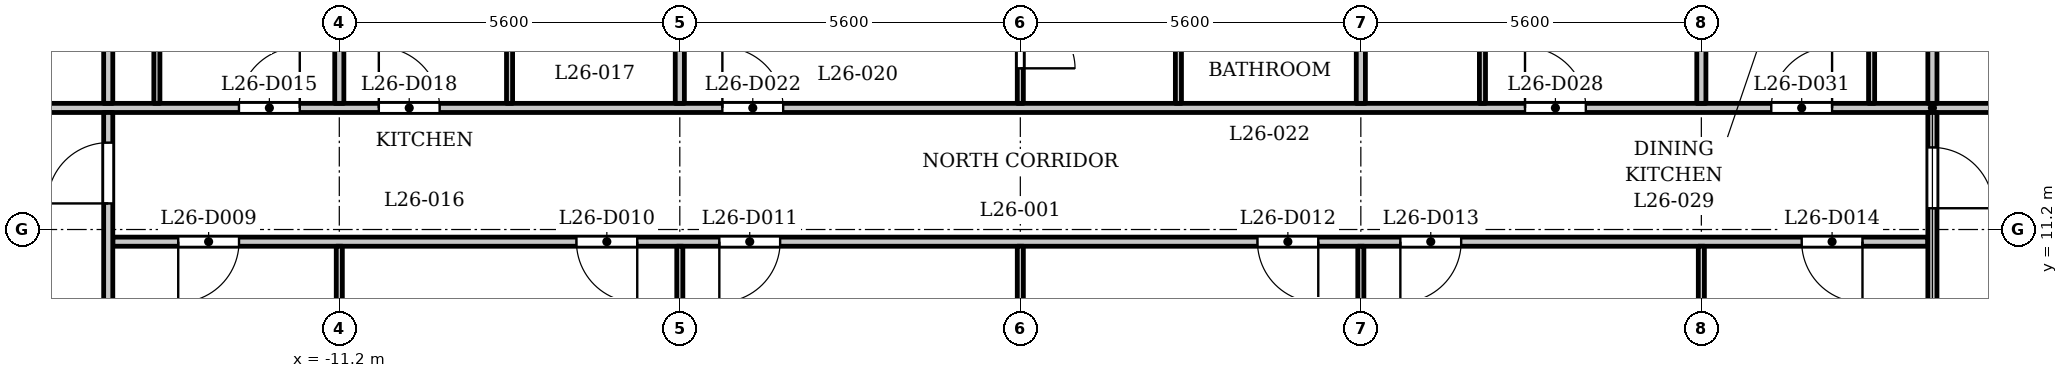
"""IFC4 building model, lengths in metres.
Left out: names, types, materials, properties, quantities, classifications, styles, units other than length and angle.
Written with IfcOpenShell. Run it as: python <this file> out.ifc"""

import sys

from ifc_helpers import new_model, si_unit, direction, frame, frame_2d, origin, place, context, subcontext, project, spatial, rectangle, extrude, element, fill, save


model = new_model("IFC4")
c1 = context("Model", 3, precision=1e-05, world=origin(), true_north=direction((0.0, 1.0)))
c2 = subcontext(c1, "Body", "Model", "MODEL_VIEW")
j1 = project(units=[si_unit("LENGTHUNIT", "METRE"), si_unit("PLANEANGLEUNIT", "RADIAN")], contexts=[c1])
p1 = place(None, origin())
s1 = spatial("IfcSite", under=j1, at=p1, CompositionType="ELEMENT")
p2 = place(p1, origin())
s2 = spatial("IfcBuilding", under=s1, at=p2, CompositionType="ELEMENT")
p3 = place(p2, frame((0.0, 0.0, 104.3)))
s3 = spatial("IfcBuildingStorey", under=s2, at=p3, CompositionType="ELEMENT", Elevation=104.3)
p4 = place(p3, frame((-14.925, 11.0, 0.0), z_axis=(0.0, 0.0, 1.0), x_axis=(1.0, 0.0, 0.0)))
e1 = element("IfcWall", 1, at=p4, inside=s3, PredefinedType="PARTITIONING", context=c2, shape_type="SweptSolid", body=[
    extrude(rectangle(XDim=29.85, YDim=0.15, at=frame_2d((14.925, 0.0))), origin(), (0.0, 0.0, 1.0), 3.2),
])
p5 = place(p4, frame((1.076, 0.0, 0.0)))
e2 = element("IfcOpeningElement", 2, at=p5, cuts=e1, PredefinedType="OPENING", context=c2, shape_type="SweptSolid", body=[
    extrude(rectangle(XDim=1.0, YDim=2.1, at=frame_2d((0.5, 1.05))), frame((0.0, 0.085, 0.0), z_axis=(0.0, -1.0, 0.0), x_axis=(1.0, 0.0, 0.0)), (0.0, 0.0, 1.0), 0.17),
])
p6 = place(p4, frame((7.625, 0.0, 0.0)))
e3 = element("IfcOpeningElement", 3, at=p6, cuts=e1, PredefinedType="OPENING", context=c2, shape_type="SweptSolid", body=[
    extrude(rectangle(XDim=1.0, YDim=2.1, at=frame_2d((0.5, 1.05))), frame((0.0, 0.085, 0.0), z_axis=(0.0, -1.0, 0.0), x_axis=(1.0, 0.0, 0.0)), (0.0, 0.0, 1.0), 0.17),
])
p7 = place(p4, frame((9.975, 0.0, 0.0)))
e4 = element("IfcOpeningElement", 4, at=p7, cuts=e1, PredefinedType="OPENING", context=c2, shape_type="SweptSolid", body=[
    extrude(rectangle(XDim=1.0, YDim=2.1, at=frame_2d((0.5, 1.05))), frame((0.0, 0.085, 0.0), z_axis=(0.0, -1.0, 0.0), x_axis=(1.0, 0.0, 0.0)), (0.0, 0.0, 1.0), 0.17),
])
p8 = place(p4, frame((18.825, 0.0, 0.0)))
e5 = element("IfcOpeningElement", 5, at=p8, cuts=e1, PredefinedType="OPENING", context=c2, shape_type="SweptSolid", body=[
    extrude(rectangle(XDim=1.0, YDim=2.1, at=frame_2d((0.5, 1.05))), frame((0.0, 0.085, 0.0), z_axis=(0.0, -1.0, 0.0), x_axis=(1.0, 0.0, 0.0)), (0.0, 0.0, 1.0), 0.17),
])
p9 = place(p4, frame((21.175, 0.0, 0.0)))
e6 = element("IfcOpeningElement", 6, at=p9, cuts=e1, PredefinedType="OPENING", context=c2, shape_type="SweptSolid", body=[
    extrude(rectangle(XDim=1.0, YDim=2.1, at=frame_2d((0.5, 1.05))), frame((0.0, 0.085, 0.0), z_axis=(0.0, -1.0, 0.0), x_axis=(1.0, 0.0, 0.0)), (0.0, 0.0, 1.0), 0.17),
])
p10 = place(p4, frame((27.775, 0.0, 0.0)))
e7 = element("IfcOpeningElement", 7, at=p10, cuts=e1, PredefinedType="OPENING", context=c2, shape_type="SweptSolid", body=[
    extrude(rectangle(XDim=1.0, YDim=2.1, at=frame_2d((0.5, 1.05))), frame((0.0, 0.085, 0.0), z_axis=(0.0, -1.0, 0.0), x_axis=(1.0, 0.0, 0.0)), (0.0, 0.0, 1.0), 0.17),
])
p11 = place(p3, frame((-17.4, 13.2, 0.0), z_axis=(0.0, 0.0, 1.0), x_axis=(1.0, 0.0, 0.0)))
e8 = element("IfcWall", 8, at=p11, inside=s3, PredefinedType="PARTITIONING", context=c2, shape_type="SweptSolid", body=[
    extrude(rectangle(XDim=34.8, YDim=0.15, at=frame_2d((17.4, 0.0))), origin(), (0.0, 0.0, 1.0), 3.2),
])
p12 = place(p11, frame((0.25, 0.0, 0.0)))
e9 = element("IfcOpeningElement", 9, at=p12, cuts=e8, PredefinedType="OPENING", context=c2, shape_type="SweptSolid", body=[
    extrude(rectangle(XDim=1.0, YDim=2.1, at=frame_2d((0.5, 1.05))), frame((0.0, 0.085, 0.0), z_axis=(0.0, -1.0, 0.0), x_axis=(1.0, 0.0, 0.0)), (0.0, 0.0, 1.0), 0.17),
])
p13 = place(p11, frame((33.65, 0.0, 0.0)))
e10 = element("IfcOpeningElement", 10, at=p13, cuts=e8, PredefinedType="OPENING", context=c2, shape_type="SweptSolid", body=[
    extrude(rectangle(XDim=1.0, YDim=2.1, at=frame_2d((0.5, 1.05))), frame((0.0, 0.085, 0.0), z_axis=(0.0, -1.0, 0.0), x_axis=(1.0, 0.0, 0.0)), (0.0, 0.0, 1.0), 0.17),
])
p14 = place(p11, frame((4.55, 0.0, 0.0)))
e11 = element("IfcOpeningElement", 11, at=p14, cuts=e8, PredefinedType="OPENING", context=c2, shape_type="SweptSolid", body=[
    extrude(rectangle(XDim=1.0, YDim=2.1, at=frame_2d((0.5, 1.05))), frame((0.0, 0.085, 0.0), z_axis=(0.0, -1.0, 0.0), x_axis=(1.0, 0.0, 0.0)), (0.0, 0.0, 1.0), 0.17),
])
p15 = place(p11, frame((6.85, 0.0, 0.0)))
e12 = element("IfcOpeningElement", 12, at=p15, cuts=e8, PredefinedType="OPENING", context=c2, shape_type="SweptSolid", body=[
    extrude(rectangle(XDim=1.0, YDim=2.1, at=frame_2d((0.5, 1.05))), frame((0.0, 0.085, 0.0), z_axis=(0.0, -1.0, 0.0), x_axis=(1.0, 0.0, 0.0)), (0.0, 0.0, 1.0), 0.17),
])
p16 = place(p11, frame((12.5, 0.0, 0.0)))
e13 = element("IfcOpeningElement", 13, at=p16, cuts=e8, PredefinedType="OPENING", context=c2, shape_type="SweptSolid", body=[
    extrude(rectangle(XDim=1.0, YDim=2.1, at=frame_2d((0.5, 1.05))), frame((0.0, 0.085, 0.0), z_axis=(0.0, -1.0, 0.0), x_axis=(1.0, 0.0, 0.0)), (0.0, 0.0, 1.0), 0.17),
])
p17 = place(p11, frame((25.7, 0.0, 0.0)))
e14 = element("IfcOpeningElement", 14, at=p17, cuts=e8, PredefinedType="OPENING", context=c2, shape_type="SweptSolid", body=[
    extrude(rectangle(XDim=1.0, YDim=2.1, at=frame_2d((0.5, 1.05))), frame((0.0, 0.085, 0.0), z_axis=(0.0, -1.0, 0.0), x_axis=(1.0, 0.0, 0.0)), (0.0, 0.0, 1.0), 0.17),
])
p18 = place(p11, frame((29.75, 0.0, 0.0)))
e15 = element("IfcOpeningElement", 15, at=p18, cuts=e8, PredefinedType="OPENING", context=c2, shape_type="SweptSolid", body=[
    extrude(rectangle(XDim=1.0, YDim=2.1, at=frame_2d((0.5, 1.05))), frame((0.0, 0.085, 0.0), z_axis=(0.0, -1.0, 0.0), x_axis=(1.0, 0.0, 0.0)), (0.0, 0.0, 1.0), 0.17),
])
p19 = place(p3, frame((-15.0, 6.769, 0.0), z_axis=(0.0, 0.0, 1.0), x_axis=(0.0, 1.0, 0.0)))
e16 = element("IfcWall", 16, at=p19, inside=s3, PredefinedType="PARTITIONING", context=c2, shape_type="SweptSolid", body=[
    extrude(rectangle(XDim=6.356, YDim=0.15, at=frame_2d((3.178, 0.0))), origin(), (0.0, 0.0, 1.0), 3.2),
])
p20 = place(p19, frame((4.86, 0.0, 0.0)))
e17 = element("IfcOpeningElement", 17, at=p20, cuts=e16, PredefinedType="OPENING", context=c2, shape_type="SweptSolid", body=[
    extrude(rectangle(XDim=1.0, YDim=2.1, at=frame_2d((0.5, 1.05))), frame((0.0, 0.085, 0.0), z_axis=(0.0, -1.0, 0.0), x_axis=(1.0, 0.0, 0.0)), (0.0, 0.0, 1.0), 0.17),
])
p21 = place(p3, frame((-15.0, 13.275, 0.0), z_axis=(0.0, 0.0, 1.0), x_axis=(0.0, 1.0, 0.0)))
e18 = element("IfcWall", 18, at=p21, inside=s3, PredefinedType="PARTITIONING", context=c2, shape_type="SweptSolid", body=[
    extrude(rectangle(XDim=2.05, YDim=0.15, at=frame_2d((1.025, 0.0))), origin(), (0.0, 0.0, 1.0), 3.2),
])
p22 = place(p3, frame((-14.2, 13.275, 0.0), z_axis=(0.0, 0.0, 1.0), x_axis=(0.0, 1.0, 0.0)))
e19 = element("IfcWall", 19, at=p22, inside=s3, PredefinedType="PARTITIONING", context=c2, shape_type="SweptSolid", body=[
    extrude(rectangle(XDim=3.175, YDim=0.1, at=frame_2d((1.587, 0.0))), origin(), (0.0, 0.0, 1.0), 3.2),
])
p23 = place(p3, frame((-11.2, 7.32, 0.0), z_axis=(0.0, 0.0, 1.0), x_axis=(0.0, 1.0, 0.0)))
e20 = element("IfcWall", 20, at=p23, inside=s3, PredefinedType="PARTITIONING", context=c2, shape_type="SweptSolid", body=[
    extrude(rectangle(XDim=3.605, YDim=0.1, at=frame_2d((1.802, 0.0))), origin(), (0.0, 0.0, 1.0), 3.2),
])
p24 = place(p3, frame((-11.2, 13.275, 0.0), z_axis=(0.0, 0.0, 1.0), x_axis=(0.0, 1.0, 0.0)))
e21 = element("IfcWall", 21, at=p24, inside=s3, PredefinedType="PARTITIONING", context=c2, shape_type="SweptSolid", body=[
    extrude(rectangle(XDim=3.175, YDim=0.15, at=frame_2d((1.587, 0.0))), origin(), (0.0, 0.0, 1.0), 3.2),
])
p25 = place(p3, frame((-8.4, 13.275, 0.0), z_axis=(0.0, 0.0, 1.0), x_axis=(0.0, 1.0, 0.0)))
e22 = element("IfcWall", 22, at=p25, inside=s3, PredefinedType="PARTITIONING", context=c2, shape_type="SweptSolid", body=[
    extrude(rectangle(XDim=3.175, YDim=0.1, at=frame_2d((1.587, 0.0))), origin(), (0.0, 0.0, 1.0), 3.2),
])
p26 = place(p3, frame((-5.6, 7.32, 0.0), z_axis=(0.0, 0.0, 1.0), x_axis=(0.0, 1.0, 0.0)))
e23 = element("IfcWall", 23, at=p26, inside=s3, PredefinedType="PARTITIONING", context=c2, shape_type="SweptSolid", body=[
    extrude(rectangle(XDim=3.605, YDim=0.1, at=frame_2d((1.802, 0.0))), origin(), (0.0, 0.0, 1.0), 3.2),
])
p27 = place(p3, frame((-5.6, 13.275, 0.0), z_axis=(0.0, 0.0, 1.0), x_axis=(0.0, 1.0, 0.0)))
e24 = element("IfcWall", 24, at=p27, inside=s3, PredefinedType="PARTITIONING", context=c2, shape_type="SweptSolid", body=[
    extrude(rectangle(XDim=3.175, YDim=0.15, at=frame_2d((1.587, 0.0))), origin(), (0.0, 0.0, 1.0), 3.2),
])
p28 = place(p3, frame((0.0, 7.32, 0.0), z_axis=(0.0, 0.0, 1.0), x_axis=(0.0, 1.0, 0.0)))
e25 = element("IfcWall", 25, at=p28, inside=s3, PredefinedType="PARTITIONING", context=c2, shape_type="SweptSolid", body=[
    extrude(rectangle(XDim=3.605, YDim=0.1, at=frame_2d((1.802, 0.0))), origin(), (0.0, 0.0, 1.0), 3.2),
])
p29 = place(p3, frame((0.0, 13.275, 0.0), z_axis=(0.0, 0.0, 1.0), x_axis=(0.0, 1.0, 0.0)))
e26 = element("IfcWall", 26, at=p29, inside=s3, PredefinedType="PARTITIONING", context=c2, shape_type="SweptSolid", body=[
    extrude(rectangle(XDim=3.175, YDim=0.1, at=frame_2d((1.587, 0.0))), origin(), (0.0, 0.0, 1.0), 3.2),
])
p30 = place(p29, frame((0.576, 0.0, 0.0)))
e27 = element("IfcOpeningElement", 27, at=p30, cuts=e26, PredefinedType="OPENING", context=c2, shape_type="SweptSolid", body=[
    extrude(rectangle(XDim=0.9, YDim=2.1, at=frame_2d((0.45, 1.05))), frame((0.0, 0.06, 0.0), z_axis=(0.0, -1.0, 0.0), x_axis=(1.0, 0.0, 0.0)), (0.0, 0.0, 1.0), 0.12),
])
p31 = place(p3, frame((2.6, 13.275, 0.0), z_axis=(0.0, 0.0, 1.0), x_axis=(0.0, 1.0, 0.0)))
e28 = element("IfcWall", 28, at=p31, inside=s3, PredefinedType="PARTITIONING", context=c2, shape_type="SweptSolid", body=[
    extrude(rectangle(XDim=3.175, YDim=0.1, at=frame_2d((1.587, 0.0))), origin(), (0.0, 0.0, 1.0), 3.2),
])
p32 = place(p3, frame((5.6, 7.32, 0.0), z_axis=(0.0, 0.0, 1.0), x_axis=(0.0, 1.0, 0.0)))
e29 = element("IfcWall", 29, at=p32, inside=s3, PredefinedType="PARTITIONING", context=c2, shape_type="SweptSolid", body=[
    extrude(rectangle(XDim=3.605, YDim=0.1, at=frame_2d((1.802, 0.0))), origin(), (0.0, 0.0, 1.0), 3.2),
])
p33 = place(p3, frame((5.6, 13.275, 0.0), z_axis=(0.0, 0.0, 1.0), x_axis=(0.0, 1.0, 0.0)))
e30 = element("IfcWall", 30, at=p33, inside=s3, PredefinedType="PARTITIONING", context=c2, shape_type="SweptSolid", body=[
    extrude(rectangle(XDim=3.175, YDim=0.15, at=frame_2d((1.587, 0.0))), origin(), (0.0, 0.0, 1.0), 3.2),
])
p34 = place(p3, frame((7.6, 13.275, 0.0), z_axis=(0.0, 0.0, 1.0), x_axis=(0.0, 1.0, 0.0)))
e31 = element("IfcWall", 31, at=p34, inside=s3, PredefinedType="PARTITIONING", context=c2, shape_type="SweptSolid", body=[
    extrude(rectangle(XDim=3.175, YDim=0.1, at=frame_2d((1.587, 0.0))), origin(), (0.0, 0.0, 1.0), 3.2),
])
p35 = place(p3, frame((11.2, 7.32, 0.0), z_axis=(0.0, 0.0, 1.0), x_axis=(0.0, 1.0, 0.0)))
e32 = element("IfcWall", 32, at=p35, inside=s3, PredefinedType="PARTITIONING", context=c2, shape_type="SweptSolid", body=[
    extrude(rectangle(XDim=3.605, YDim=0.1, at=frame_2d((1.802, 0.0))), origin(), (0.0, 0.0, 1.0), 3.2),
])
p36 = place(p3, frame((11.2, 13.275, 0.0), z_axis=(0.0, 0.0, 1.0), x_axis=(0.0, 1.0, 0.0)))
e33 = element("IfcWall", 33, at=p36, inside=s3, PredefinedType="PARTITIONING", context=c2, shape_type="SweptSolid", body=[
    extrude(rectangle(XDim=3.175, YDim=0.15, at=frame_2d((1.587, 0.0))), origin(), (0.0, 0.0, 1.0), 3.2),
])
p37 = place(p3, frame((14.0, 13.275, 0.0), z_axis=(0.0, 0.0, 1.0), x_axis=(0.0, 1.0, 0.0)))
e34 = element("IfcWall", 34, at=p37, inside=s3, PredefinedType="PARTITIONING", context=c2, shape_type="SweptSolid", body=[
    extrude(rectangle(XDim=3.175, YDim=0.1, at=frame_2d((1.587, 0.0))), origin(), (0.0, 0.0, 1.0), 3.2),
])
p38 = place(p3, frame((15.0, 6.769, 0.0), z_axis=(0.0, 0.0, 1.0), x_axis=(0.0, 1.0, 0.0)))
e35 = element("IfcWall", 35, at=p38, inside=s3, PredefinedType="PARTITIONING", context=c2, shape_type="SweptSolid", body=[
    extrude(rectangle(XDim=6.356, YDim=0.15, at=frame_2d((3.178, 0.0))), origin(), (0.0, 0.0, 1.0), 3.2),
])
p39 = place(p38, frame((4.781, 0.0, 0.0)))
e36 = element("IfcOpeningElement", 36, at=p39, cuts=e35, PredefinedType="OPENING", context=c2, shape_type="SweptSolid", body=[
    extrude(rectangle(XDim=1.0, YDim=2.1, at=frame_2d((0.5, 1.05))), frame((0.0, 0.085, 0.0), z_axis=(0.0, -1.0, 0.0), x_axis=(1.0, 0.0, 0.0)), (0.0, 0.0, 1.0), 0.17),
])
p40 = place(p3, frame((15.0, 13.275, 0.0), z_axis=(0.0, 0.0, 1.0), x_axis=(0.0, 1.0, 0.0)))
e37 = element("IfcWall", 37, at=p40, inside=s3, PredefinedType="PARTITIONING", context=c2, shape_type="SweptSolid", body=[
    extrude(rectangle(XDim=2.05, YDim=0.15, at=frame_2d((1.025, 0.0))), origin(), (0.0, 0.0, 1.0), 3.2),
])
p41 = place(p20, origin())
e38 = element("IfcDoor", 38, at=p41, inside=s3, OperationType="SINGLE_SWING_RIGHT", PredefinedType="DOOR", context=c2, shape_type="SweptSolid", body=[
    extrude(rectangle(XDim=1.0, YDim=2.1, at=frame_2d((0.5, 1.05))), frame((0.0, 0.025, 0.0), z_axis=(0.0, -1.0, 0.0), x_axis=(1.0, 0.0, 0.0)), (0.0, 0.0, 1.0), 0.05),
])
fill(e17, e38)
p42 = place(p39, origin())
e39 = element("IfcDoor", 39, at=p42, inside=s3, OperationType="SINGLE_SWING_LEFT", PredefinedType="DOOR", context=c2, shape_type="SweptSolid", body=[
    extrude(rectangle(XDim=1.0, YDim=2.1, at=frame_2d((0.5, 1.05))), frame((0.0, 0.025, 0.0), z_axis=(0.0, -1.0, 0.0), x_axis=(1.0, 0.0, 0.0)), (0.0, 0.0, 1.0), 0.05),
])
fill(e36, e39)
p43 = place(p5, origin())
e40 = element("IfcDoor", 40, at=p43, inside=s3, OperationType="SINGLE_SWING_LEFT", PredefinedType="DOOR", context=c2, shape_type="SweptSolid", body=[
    extrude(rectangle(XDim=1.0, YDim=2.1, at=frame_2d((0.5, 1.05))), frame((0.0, 0.025, 0.0), z_axis=(0.0, -1.0, 0.0), x_axis=(1.0, 0.0, 0.0)), (0.0, 0.0, 1.0), 0.05),
])
fill(e2, e40)
p44 = place(p6, origin())
e41 = element("IfcDoor", 41, at=p44, inside=s3, OperationType="SINGLE_SWING_RIGHT", PredefinedType="DOOR", context=c2, shape_type="SweptSolid", body=[
    extrude(rectangle(XDim=1.0, YDim=2.1, at=frame_2d((0.5, 1.05))), frame((0.0, 0.025, 0.0), z_axis=(0.0, -1.0, 0.0), x_axis=(1.0, 0.0, 0.0)), (0.0, 0.0, 1.0), 0.05),
])
fill(e3, e41)
p45 = place(p7, origin())
e42 = element("IfcDoor", 42, at=p45, inside=s3, OperationType="SINGLE_SWING_LEFT", PredefinedType="DOOR", context=c2, shape_type="SweptSolid", body=[
    extrude(rectangle(XDim=1.0, YDim=2.1, at=frame_2d((0.5, 1.05))), frame((0.0, 0.025, 0.0), z_axis=(0.0, -1.0, 0.0), x_axis=(1.0, 0.0, 0.0)), (0.0, 0.0, 1.0), 0.05),
])
fill(e4, e42)
p46 = place(p8, origin())
e43 = element("IfcDoor", 43, at=p46, inside=s3, OperationType="SINGLE_SWING_RIGHT", PredefinedType="DOOR", context=c2, shape_type="SweptSolid", body=[
    extrude(rectangle(XDim=1.0, YDim=2.1, at=frame_2d((0.5, 1.05))), frame((0.0, 0.025, 0.0), z_axis=(0.0, -1.0, 0.0), x_axis=(1.0, 0.0, 0.0)), (0.0, 0.0, 1.0), 0.05),
])
fill(e5, e43)
p47 = place(p9, origin())
e44 = element("IfcDoor", 44, at=p47, inside=s3, OperationType="SINGLE_SWING_LEFT", PredefinedType="DOOR", context=c2, shape_type="SweptSolid", body=[
    extrude(rectangle(XDim=1.0, YDim=2.1, at=frame_2d((0.5, 1.05))), frame((0.0, 0.025, 0.0), z_axis=(0.0, -1.0, 0.0), x_axis=(1.0, 0.0, 0.0)), (0.0, 0.0, 1.0), 0.05),
])
fill(e6, e44)
p48 = place(p10, origin())
e45 = element("IfcDoor", 45, at=p48, inside=s3, OperationType="SINGLE_SWING_RIGHT", PredefinedType="DOOR", context=c2, shape_type="SweptSolid", body=[
    extrude(rectangle(XDim=1.0, YDim=2.1, at=frame_2d((0.5, 1.05))), frame((0.0, 0.025, 0.0), z_axis=(0.0, -1.0, 0.0), x_axis=(1.0, 0.0, 0.0)), (0.0, 0.0, 1.0), 0.05),
])
fill(e7, e45)
p49 = place(p14, origin())
e46 = element("IfcDoor", 46, at=p49, inside=s3, OperationType="SINGLE_SWING_LEFT", PredefinedType="DOOR", context=c2, shape_type="SweptSolid", body=[
    extrude(rectangle(XDim=1.0, YDim=2.1, at=frame_2d((0.5, 1.05))), frame((0.0, 0.025, 0.0), z_axis=(0.0, -1.0, 0.0), x_axis=(1.0, 0.0, 0.0)), (0.0, 0.0, 1.0), 0.05),
])
fill(e11, e46)
p50 = place(p15, origin())
e47 = element("IfcDoor", 47, at=p50, inside=s3, OperationType="SINGLE_SWING_RIGHT", PredefinedType="DOOR", context=c2, shape_type="SweptSolid", body=[
    extrude(rectangle(XDim=1.0, YDim=2.1, at=frame_2d((0.5, 1.05))), frame((0.0, 0.025, 0.0), z_axis=(0.0, -1.0, 0.0), x_axis=(1.0, 0.0, 0.0)), (0.0, 0.0, 1.0), 0.05),
])
fill(e12, e47)
p51 = place(p16, origin())
e48 = element("IfcDoor", 48, at=p51, inside=s3, OperationType="SINGLE_SWING_RIGHT", PredefinedType="DOOR", context=c2, shape_type="SweptSolid", body=[
    extrude(rectangle(XDim=1.0, YDim=2.1, at=frame_2d((0.5, 1.05))), frame((0.0, 0.025, 0.0), z_axis=(0.0, -1.0, 0.0), x_axis=(1.0, 0.0, 0.0)), (0.0, 0.0, 1.0), 0.05),
])
fill(e13, e48)
p52 = place(p30, origin())
e49 = element("IfcDoor", 49, at=p52, inside=s3, OperationType="SINGLE_SWING_LEFT", PredefinedType="DOOR", context=c2, shape_type="SweptSolid", body=[
    extrude(rectangle(XDim=0.9, YDim=2.1, at=frame_2d((0.45, 1.05))), frame((0.0, 0.025, 0.0), z_axis=(0.0, -1.0, 0.0), x_axis=(1.0, 0.0, 0.0)), (0.0, 0.0, 1.0), 0.05),
])
fill(e27, e49)
p53 = place(p17, origin())
e50 = element("IfcDoor", 50, at=p53, inside=s3, OperationType="SINGLE_SWING_RIGHT", PredefinedType="DOOR", context=c2, shape_type="SweptSolid", body=[
    extrude(rectangle(XDim=1.0, YDim=2.1, at=frame_2d((0.5, 1.05))), frame((0.0, 0.025, 0.0), z_axis=(0.0, -1.0, 0.0), x_axis=(1.0, 0.0, 0.0)), (0.0, 0.0, 1.0), 0.05),
])
fill(e14, e50)
p54 = place(p18, origin())
e51 = element("IfcDoor", 51, at=p54, inside=s3, OperationType="SINGLE_SWING_LEFT", PredefinedType="DOOR", context=c2, shape_type="SweptSolid", body=[
    extrude(rectangle(XDim=1.0, YDim=2.1, at=frame_2d((0.5, 1.05))), frame((0.0, 0.025, 0.0), z_axis=(0.0, -1.0, 0.0), x_axis=(1.0, 0.0, 0.0)), (0.0, 0.0, 1.0), 0.05),
])
fill(e15, e51)
save(model, sys.argv[1])
